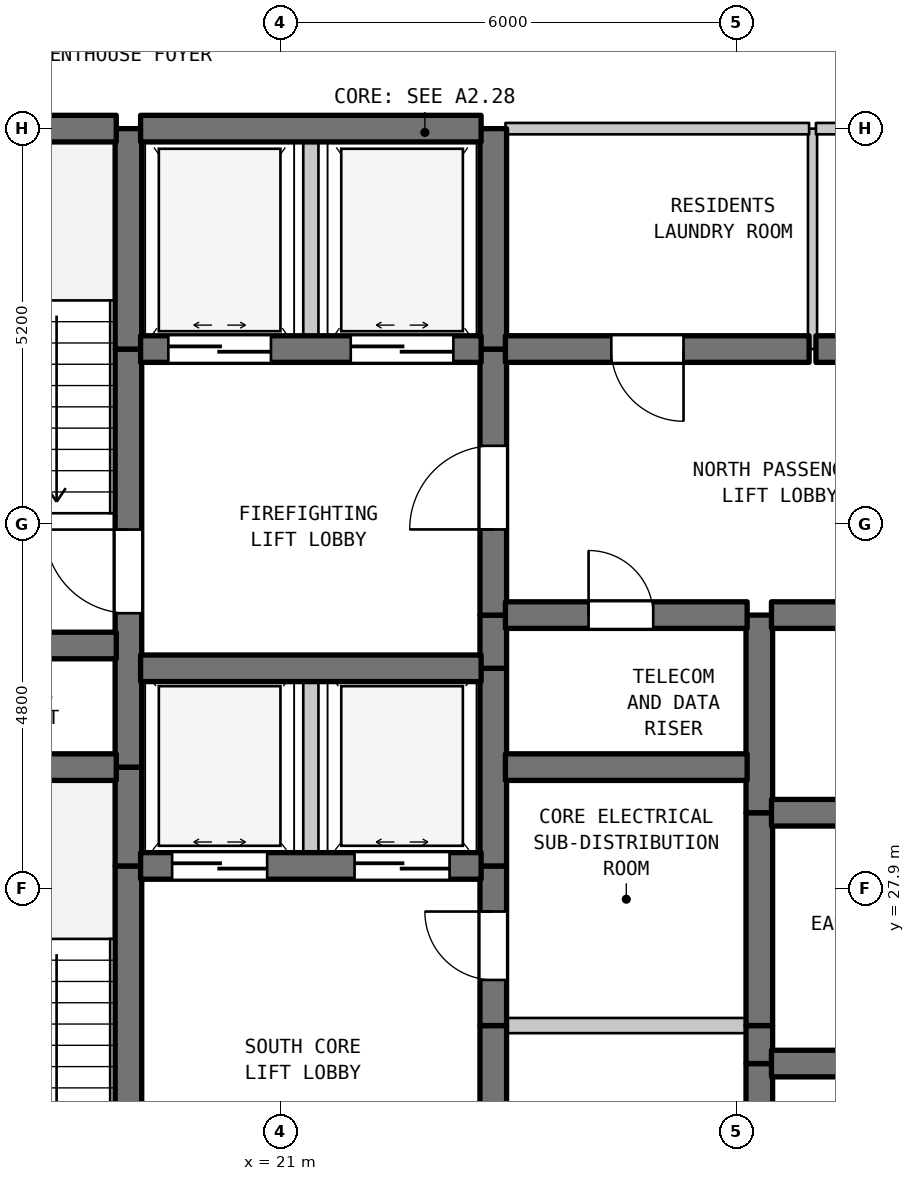
"""IFC4 building model, lengths in metres.
Left out: names, types, materials, properties, quantities, classifications, styles, units other than length and angle.
Written with IfcOpenShell. Run it as: python <this file> out.ifc"""

import sys

from ifc_helpers import new_model, si_unit, direction, frame, frame_2d, origin, place, context, subcontext, project, spatial, rectangle, extrude, element, fill, save


model = new_model("IFC4")
c1 = context("Model", 3, precision=1e-05, world=origin(), true_north=direction((0.0, 1.0)))
c2 = subcontext(c1, "Body", "Model", "MODEL_VIEW")
j1 = project(units=[si_unit("LENGTHUNIT", "METRE"), si_unit("PLANEANGLEUNIT", "RADIAN")], contexts=[c1])
p1 = place(None, origin())
s1 = spatial("IfcSite", under=j1, at=p1, CompositionType="ELEMENT")
p2 = place(p1, origin())
s2 = spatial("IfcBuilding", under=s1, at=p2, CompositionType="ELEMENT")
p3 = place(p2, frame((0.0, 0.0, 251.0)))
s3 = spatial("IfcBuildingStorey", under=s2, at=p3, CompositionType="ELEMENT", Elevation=251.0)
p4 = place(p3, frame((19.0, 22.7, 0.0), z_axis=(0.0, 0.0, 1.0), x_axis=(0.0, 1.0, 0.0)))
e1 = element("IfcWall", 1, at=p4, inside=s3, PredefinedType="SHEAR", context=c2, shape_type="SweptSolid", body=[
    extrude(rectangle(XDim=5.5, YDim=0.35, at=frame_2d((2.75, 0.0))), origin(), (0.0, 0.0, 1.0), 3.39),
])
p5 = place(p4, frame((0.631, 0.0, 0.0)))
e2 = element("IfcOpeningElement", 2, at=p5, cuts=e1, PredefinedType="OPENING", context=c2, shape_type="SweptSolid", body=[
    extrude(rectangle(XDim=1.1, YDim=2.15, at=frame_2d((0.55, 1.075))), frame((0.0, 0.185, 0.0), z_axis=(0.0, -1.0, 0.0), x_axis=(1.0, 0.0, 0.0)), (0.0, 0.0, 1.0), 0.37),
])
p6 = place(p3, frame((19.0, 28.2, 0.0), z_axis=(0.0, 0.0, 1.0), x_axis=(0.0, 1.0, 0.0)))
e3 = element("IfcWall", 3, at=p6, inside=s3, PredefinedType="SHEAR", context=c2, shape_type="SweptSolid", body=[
    extrude(rectangle(XDim=1.3, YDim=0.35, at=frame_2d((0.65, 0.0))), origin(), (0.0, 0.0, 1.0), 3.39),
])
p7 = place(p3, frame((19.0, 29.5, 0.0), z_axis=(0.0, 0.0, 1.0), x_axis=(0.0, 1.0, 0.0)))
e4 = element("IfcWall", 4, at=p7, inside=s3, PredefinedType="SHEAR", context=c2, shape_type="SweptSolid", body=[
    extrude(rectangle(XDim=5.5, YDim=0.35, at=frame_2d((2.75, 0.0))), origin(), (0.0, 0.0, 1.0), 3.39),
])
p8 = place(p7, frame((2.025, 0.0, 0.0)))
e5 = element("IfcOpeningElement", 5, at=p8, cuts=e4, PredefinedType="OPENING", context=c2, shape_type="SweptSolid", body=[
    extrude(rectangle(XDim=1.1, YDim=2.15, at=frame_2d((0.55, 1.075))), frame((0.0, 0.185, 0.0), z_axis=(0.0, -1.0, 0.0), x_axis=(1.0, 0.0, 0.0)), (0.0, 0.0, 1.0), 0.37),
])
p9 = place(p3, frame((19.0, 35.0, 0.0), z_axis=(0.0, 0.0, 1.0), x_axis=(0.0, 1.0, 0.0)))
e6 = element("IfcWall", 6, at=p9, inside=s3, PredefinedType="SHEAR", context=c2, shape_type="SweptSolid", body=[
    extrude(rectangle(XDim=2.9, YDim=0.35, at=frame_2d((1.45, 0.0))), origin(), (0.0, 0.0, 1.0), 3.39),
])
p10 = place(p3, frame((21.4, 28.2, 0.0), z_axis=(0.0, 0.0, 1.0), x_axis=(0.0, 1.0, 0.0)))
e7 = element("IfcWall", 7, at=p10, inside=s3, PredefinedType="STANDARD", context=c2, shape_type="SweptSolid", body=[
    extrude(rectangle(XDim=2.6, YDim=0.2, at=frame_2d((1.3, 0.0))), origin(), (0.0, 0.0, 1.0), 3.39),
])
p11 = place(p3, frame((21.4, 35.0, 0.0), z_axis=(0.0, 0.0, 1.0), x_axis=(0.0, 1.0, 0.0)))
e8 = element("IfcWall", 8, at=p11, inside=s3, PredefinedType="STANDARD", context=c2, shape_type="SweptSolid", body=[
    extrude(rectangle(XDim=2.9, YDim=0.2, at=frame_2d((1.45, 0.0))), origin(), (0.0, 0.0, 1.0), 3.39),
])
p12 = place(p3, frame((23.8, 22.7, 0.0), z_axis=(0.0, 0.0, 1.0), x_axis=(0.0, 1.0, 0.0)))
e9 = element("IfcWall", 9, at=p12, inside=s3, PredefinedType="SHEAR", context=c2, shape_type="SweptSolid", body=[
    extrude(rectangle(XDim=3.4, YDim=0.35, at=frame_2d((1.7, 0.0))), origin(), (0.0, 0.0, 1.0), 3.39),
])
p13 = place(p12, frame((1.25, 0.0, 0.0)))
e10 = element("IfcOpeningElement", 10, at=p13, cuts=e9, PredefinedType="OPENING", context=c2, shape_type="SweptSolid", body=[
    extrude(rectangle(XDim=0.9, YDim=2.15, at=frame_2d((0.45, 1.075))), frame((0.0, 0.185, 0.0), z_axis=(0.0, -1.0, 0.0), x_axis=(1.0, 0.0, 0.0)), (0.0, 0.0, 1.0), 0.37),
])
p14 = place(p3, frame((23.8, 26.1, 0.0), z_axis=(0.0, 0.0, 1.0), x_axis=(0.0, 1.0, 0.0)))
e11 = element("IfcWall", 11, at=p14, inside=s3, PredefinedType="SHEAR", context=c2, shape_type="SweptSolid", body=[
    extrude(rectangle(XDim=2.1, YDim=0.35, at=frame_2d((1.05, 0.0))), origin(), (0.0, 0.0, 1.0), 3.39),
])
p15 = place(p14, frame((0.6, 0.0, 0.0)))
e12 = element("IfcOpeningElement", 12, at=p15, cuts=e11, PredefinedType="OPENING", context=c2, shape_type="SweptSolid", body=[
    extrude(rectangle(XDim=0.9, YDim=2.15, at=frame_2d((0.45, 1.075))), frame((0.0, 0.185, 0.0), z_axis=(0.0, -1.0, 0.0), x_axis=(1.0, 0.0, 0.0)), (0.0, 0.0, 1.0), 0.37),
])
p16 = place(p3, frame((23.8, 28.2, 0.0), z_axis=(0.0, 0.0, 1.0), x_axis=(0.0, 1.0, 0.0)))
e13 = element("IfcWall", 13, at=p16, inside=s3, PredefinedType="SHEAR", context=c2, shape_type="SweptSolid", body=[
    extrude(rectangle(XDim=2.6, YDim=0.35, at=frame_2d((1.3, 0.0))), origin(), (0.0, 0.0, 1.0), 3.39),
])
p17 = place(p3, frame((23.8, 30.8, 0.0), z_axis=(0.0, 0.0, 1.0), x_axis=(0.0, 1.0, 0.0)))
e14 = element("IfcWall", 14, at=p17, inside=s3, PredefinedType="SHEAR", context=c2, shape_type="SweptSolid", body=[
    extrude(rectangle(XDim=0.7, YDim=0.35, at=frame_2d((0.35, 0.0))), origin(), (0.0, 0.0, 1.0), 3.39),
])
p18 = place(p3, frame((23.8, 31.5, 0.0), z_axis=(0.0, 0.0, 1.0), x_axis=(0.0, 1.0, 0.0)))
e15 = element("IfcWall", 15, at=p18, inside=s3, PredefinedType="SHEAR", context=c2, shape_type="SweptSolid", body=[
    extrude(rectangle(XDim=3.5, YDim=0.35, at=frame_2d((1.75, 0.0))), origin(), (0.0, 0.0, 1.0), 3.39),
])
p19 = place(p18, frame((1.127, 0.0, 0.0)))
e16 = element("IfcOpeningElement", 16, at=p19, cuts=e15, PredefinedType="OPENING", context=c2, shape_type="SweptSolid", body=[
    extrude(rectangle(XDim=1.1, YDim=2.15, at=frame_2d((0.55, 1.075))), frame((0.0, 0.185, 0.0), z_axis=(0.0, -1.0, 0.0), x_axis=(1.0, 0.0, 0.0)), (0.0, 0.0, 1.0), 0.37),
])
p20 = place(p3, frame((23.8, 35.0, 0.0), z_axis=(0.0, 0.0, 1.0), x_axis=(0.0, 1.0, 0.0)))
e17 = element("IfcWall", 17, at=p20, inside=s3, PredefinedType="SHEAR", context=c2, shape_type="SweptSolid", body=[
    extrude(rectangle(XDim=2.9, YDim=0.35, at=frame_2d((1.45, 0.0))), origin(), (0.0, 0.0, 1.0), 3.39),
])
p21 = place(p3, frame((27.3, 22.7, 0.0), z_axis=(0.0, 0.0, 1.0), x_axis=(0.0, 1.0, 0.0)))
e18 = element("IfcWall", 18, at=p21, inside=s3, PredefinedType="SHEAR", context=c2, shape_type="SweptSolid", body=[
    extrude(rectangle(XDim=2.9, YDim=0.35, at=frame_2d((1.45, 0.0))), origin(), (0.0, 0.0, 1.0), 3.39),
])
p22 = place(p3, frame((27.3, 25.6, 0.0), z_axis=(0.0, 0.0, 1.0), x_axis=(0.0, 1.0, 0.0)))
e19 = element("IfcWall", 19, at=p22, inside=s3, PredefinedType="SHEAR", context=c2, shape_type="SweptSolid", body=[
    extrude(rectangle(XDim=0.5, YDim=0.35, at=frame_2d((0.25, 0.0))), origin(), (0.0, 0.0, 1.0), 3.39),
])
p23 = place(p3, frame((27.3, 26.1, 0.0), z_axis=(0.0, 0.0, 1.0), x_axis=(0.0, 1.0, 0.0)))
e20 = element("IfcWall", 20, at=p23, inside=s3, PredefinedType="SHEAR", context=c2, shape_type="SweptSolid", body=[
    extrude(rectangle(XDim=2.8, YDim=0.35, at=frame_2d((1.4, 0.0))), origin(), (0.0, 0.0, 1.0), 3.39),
])
p24 = place(p3, frame((27.3, 28.9, 0.0), z_axis=(0.0, 0.0, 1.0), x_axis=(0.0, 1.0, 0.0)))
e21 = element("IfcWall", 21, at=p24, inside=s3, PredefinedType="SHEAR", context=c2, shape_type="SweptSolid", body=[
    extrude(rectangle(XDim=2.6, YDim=0.35, at=frame_2d((1.3, 0.0))), origin(), (0.0, 0.0, 1.0), 3.39),
])
p25 = place(p3, frame((28.0, 35.0, 0.0), z_axis=(0.0, 0.0, 1.0), x_axis=(0.0, 1.0, 0.0)))
e22 = element("IfcWall", 22, at=p25, inside=s3, PredefinedType="PARTITIONING", context=c2, shape_type="SweptSolid", body=[
    extrude(rectangle(XDim=2.9, YDim=0.12, at=frame_2d((1.45, 0.0))), origin(), (0.0, 0.0, 1.0), 3.39),
])
p26 = place(p3, frame((27.46, 25.6, 0.0), z_axis=(0.0, 0.0, 1.0), x_axis=(1.0, 0.0, 0.0)))
e23 = element("IfcWall", 23, at=p26, inside=s3, PredefinedType="SHEAR", context=c2, shape_type="SweptSolid", body=[
    extrude(rectangle(XDim=3.18, YDim=0.35, at=frame_2d((1.59, 0.0))), origin(), (0.0, 0.0, 1.0), 3.39),
])
p27 = place(p26, frame((1.115, 0.0, 0.0)))
e24 = element("IfcOpeningElement", 24, at=p27, cuts=e23, PredefinedType="OPENING", context=c2, shape_type="SweptSolid", body=[
    extrude(rectangle(XDim=0.95, YDim=2.15, at=frame_2d((0.475, 1.075))), frame((0.0, 0.185, 0.0), z_axis=(0.0, -1.0, 0.0), x_axis=(1.0, 0.0, 0.0)), (0.0, 0.0, 1.0), 0.37),
])
p28 = place(p3, frame((23.96, 26.1, 0.0), z_axis=(0.0, 0.0, 1.0), x_axis=(1.0, 0.0, 0.0)))
e25 = element("IfcWall", 25, at=p28, inside=s3, PredefinedType="STANDARD", context=c2, shape_type="SweptSolid", body=[
    extrude(rectangle(XDim=3.18, YDim=0.2, at=frame_2d((1.59, 0.0))), origin(), (0.0, 0.0, 1.0), 3.39),
])
p29 = place(p3, frame((19.16, 28.2, 0.0), z_axis=(0.0, 0.0, 1.0), x_axis=(1.0, 0.0, 0.0)))
e26 = element("IfcWall", 26, at=p29, inside=s3, PredefinedType="SHEAR", context=c2, shape_type="SweptSolid", body=[
    extrude(rectangle(XDim=4.48, YDim=0.35, at=frame_2d((2.24, 0.0))), origin(), (0.0, 0.0, 1.0), 3.39),
])
p30 = place(p29, frame((0.415, 0.0, 0.0)))
e27 = element("IfcOpeningElement", 27, at=p30, cuts=e26, PredefinedType="OPENING", context=c2, shape_type="SweptSolid", body=[
    extrude(rectangle(XDim=1.25, YDim=2.2, at=frame_2d((0.625, 1.1))), frame((0.0, 0.185, 0.0), z_axis=(0.0, -1.0, 0.0), x_axis=(1.0, 0.0, 0.0)), (0.0, 0.0, 1.0), 0.37),
])
p31 = place(p29, frame((2.815, 0.0, 0.0)))
e28 = element("IfcOpeningElement", 28, at=p31, cuts=e26, PredefinedType="OPENING", context=c2, shape_type="SweptSolid", body=[
    extrude(rectangle(XDim=1.25, YDim=2.2, at=frame_2d((0.625, 1.1))), frame((0.0, 0.185, 0.0), z_axis=(0.0, -1.0, 0.0), x_axis=(1.0, 0.0, 0.0)), (0.0, 0.0, 1.0), 0.37),
])
p32 = place(p3, frame((27.46, 28.9, 0.0), z_axis=(0.0, 0.0, 1.0), x_axis=(1.0, 0.0, 0.0)))
e29 = element("IfcWall", 29, at=p32, inside=s3, PredefinedType="SHEAR", context=c2, shape_type="SweptSolid", body=[
    extrude(rectangle(XDim=3.18, YDim=0.35, at=frame_2d((1.59, 0.0))), origin(), (0.0, 0.0, 1.0), 3.39),
])
p33 = place(p32, frame((1.115, 0.0, 0.0)))
e30 = element("IfcOpeningElement", 30, at=p33, cuts=e29, PredefinedType="OPENING", context=c2, shape_type="SweptSolid", body=[
    extrude(rectangle(XDim=0.95, YDim=2.15, at=frame_2d((0.475, 1.075))), frame((0.0, 0.185, 0.0), z_axis=(0.0, -1.0, 0.0), x_axis=(1.0, 0.0, 0.0)), (0.0, 0.0, 1.0), 0.37),
])
p34 = place(p3, frame((15.16, 29.5, 0.0), z_axis=(0.0, 0.0, 1.0), x_axis=(1.0, 0.0, 0.0)))
e31 = element("IfcWall", 31, at=p34, inside=s3, PredefinedType="SHEAR", context=c2, shape_type="SweptSolid", body=[
    extrude(rectangle(XDim=3.68, YDim=0.35, at=frame_2d((1.84, 0.0))), origin(), (0.0, 0.0, 1.0), 3.39),
])
p35 = place(p3, frame((23.96, 29.5, 0.0), z_axis=(0.0, 0.0, 1.0), x_axis=(1.0, 0.0, 0.0)))
e32 = element("IfcWall", 32, at=p35, inside=s3, PredefinedType="SHEAR", context=c2, shape_type="SweptSolid", body=[
    extrude(rectangle(XDim=3.18, YDim=0.35, at=frame_2d((1.59, 0.0))), origin(), (0.0, 0.0, 1.0), 3.39),
])
p36 = place(p3, frame((19.16, 30.8, 0.0), z_axis=(0.0, 0.0, 1.0), x_axis=(1.0, 0.0, 0.0)))
e33 = element("IfcWall", 33, at=p36, inside=s3, PredefinedType="SHEAR", context=c2, shape_type="SweptSolid", body=[
    extrude(rectangle(XDim=4.48, YDim=0.35, at=frame_2d((2.24, 0.0))), origin(), (0.0, 0.0, 1.0), 3.39),
])
p37 = place(p3, frame((15.16, 31.1, 0.0), z_axis=(0.0, 0.0, 1.0), x_axis=(1.0, 0.0, 0.0)))
e34 = element("IfcWall", 34, at=p37, inside=s3, PredefinedType="SHEAR", context=c2, shape_type="SweptSolid", body=[
    extrude(rectangle(XDim=3.68, YDim=0.35, at=frame_2d((1.84, 0.0))), origin(), (0.0, 0.0, 1.0), 3.39),
])
p38 = place(p3, frame((23.96, 31.5, 0.0), z_axis=(0.0, 0.0, 1.0), x_axis=(1.0, 0.0, 0.0)))
e35 = element("IfcWall", 35, at=p38, inside=s3, PredefinedType="SHEAR", context=c2, shape_type="SweptSolid", body=[
    extrude(rectangle(XDim=3.18, YDim=0.35, at=frame_2d((1.59, 0.0))), origin(), (0.0, 0.0, 1.0), 3.39),
])
p39 = place(p38, frame((1.094, 0.0, 0.0)))
e36 = element("IfcOpeningElement", 36, at=p39, cuts=e35, PredefinedType="OPENING", context=c2, shape_type="SweptSolid", body=[
    extrude(rectangle(XDim=0.85, YDim=2.1, at=frame_2d((0.425, 1.05))), frame((0.0, 0.185, 0.0), z_axis=(0.0, -1.0, 0.0), x_axis=(1.0, 0.0, 0.0)), (0.0, 0.0, 1.0), 0.37),
])
p40 = place(p3, frame((27.46, 31.5, 0.0), z_axis=(0.0, 0.0, 1.0), x_axis=(1.0, 0.0, 0.0)))
e37 = element("IfcWall", 37, at=p40, inside=s3, PredefinedType="SHEAR", context=c2, shape_type="SweptSolid", body=[
    extrude(rectangle(XDim=3.18, YDim=0.35, at=frame_2d((1.59, 0.0))), origin(), (0.0, 0.0, 1.0), 3.39),
])
p41 = place(p3, frame((19.16, 35.0, 0.0), z_axis=(0.0, 0.0, 1.0), x_axis=(1.0, 0.0, 0.0)))
e38 = element("IfcWall", 38, at=p41, inside=s3, PredefinedType="SHEAR", context=c2, shape_type="SweptSolid", body=[
    extrude(rectangle(XDim=4.48, YDim=0.35, at=frame_2d((2.24, 0.0))), origin(), (0.0, 0.0, 1.0), 3.39),
])
p42 = place(p41, frame((0.365, 0.0, 0.0)))
e39 = element("IfcOpeningElement", 39, at=p42, cuts=e38, PredefinedType="OPENING", context=c2, shape_type="SweptSolid", body=[
    extrude(rectangle(XDim=1.35, YDim=2.2, at=frame_2d((0.675, 1.1))), frame((0.0, 0.185, 0.0), z_axis=(0.0, -1.0, 0.0), x_axis=(1.0, 0.0, 0.0)), (0.0, 0.0, 1.0), 0.37),
])
p43 = place(p41, frame((2.765, 0.0, 0.0)))
e40 = element("IfcOpeningElement", 40, at=p43, cuts=e38, PredefinedType="OPENING", context=c2, shape_type="SweptSolid", body=[
    extrude(rectangle(XDim=1.35, YDim=2.2, at=frame_2d((0.675, 1.1))), frame((0.0, 0.185, 0.0), z_axis=(0.0, -1.0, 0.0), x_axis=(1.0, 0.0, 0.0)), (0.0, 0.0, 1.0), 0.37),
])
p44 = place(p3, frame((23.96, 35.0, 0.0), z_axis=(0.0, 0.0, 1.0), x_axis=(1.0, 0.0, 0.0)))
e41 = element("IfcWall", 41, at=p44, inside=s3, PredefinedType="SHEAR", context=c2, shape_type="SweptSolid", body=[
    extrude(rectangle(XDim=3.995, YDim=0.35, at=frame_2d((1.998, 0.0))), origin(), (0.0, 0.0, 1.0), 3.39),
])
p45 = place(p44, frame((1.393, 0.0, 0.0)))
e42 = element("IfcOpeningElement", 42, at=p45, cuts=e41, PredefinedType="OPENING", context=c2, shape_type="SweptSolid", body=[
    extrude(rectangle(XDim=0.95, YDim=2.15, at=frame_2d((0.475, 1.075))), frame((0.0, 0.185, 0.0), z_axis=(0.0, -1.0, 0.0), x_axis=(1.0, 0.0, 0.0)), (0.0, 0.0, 1.0), 0.37),
])
p46 = place(p3, frame((28.045, 35.0, 0.0), z_axis=(0.0, 0.0, 1.0), x_axis=(1.0, 0.0, 0.0)))
e43 = element("IfcWall", 43, at=p46, inside=s3, PredefinedType="SHEAR", context=c2, shape_type="SweptSolid", body=[
    extrude(rectangle(XDim=2.595, YDim=0.35, at=frame_2d((1.297, 0.0))), origin(), (0.0, 0.0, 1.0), 3.39),
])
p47 = place(p46, frame((0.806, 0.0, 0.0)))
e44 = element("IfcOpeningElement", 44, at=p47, cuts=e43, PredefinedType="OPENING", context=c2, shape_type="SweptSolid", body=[
    extrude(rectangle(XDim=0.95, YDim=2.15, at=frame_2d((0.475, 1.075))), frame((0.0, 0.185, 0.0), z_axis=(0.0, -1.0, 0.0), x_axis=(1.0, 0.0, 0.0)), (0.0, 0.0, 1.0), 0.37),
])
p48 = place(p3, frame((15.16, 37.9, 0.0), z_axis=(0.0, 0.0, 1.0), x_axis=(1.0, 0.0, 0.0)))
e45 = element("IfcWall", 45, at=p48, inside=s3, PredefinedType="SHEAR", context=c2, shape_type="SweptSolid", body=[
    extrude(rectangle(XDim=3.68, YDim=0.35, at=frame_2d((1.84, 0.0))), origin(), (0.0, 0.0, 1.0), 3.39),
])
p49 = place(p3, frame((19.16, 37.9, 0.0), z_axis=(0.0, 0.0, 1.0), x_axis=(1.0, 0.0, 0.0)))
e46 = element("IfcWall", 46, at=p49, inside=s3, PredefinedType="SHEAR", context=c2, shape_type="SweptSolid", body=[
    extrude(rectangle(XDim=4.48, YDim=0.35, at=frame_2d((2.24, 0.0))), origin(), (0.0, 0.0, 1.0), 3.39),
])
p50 = place(p3, frame((23.96, 37.9, 0.0), z_axis=(0.0, 0.0, 1.0), x_axis=(1.0, 0.0, 0.0)))
e47 = element("IfcWall", 47, at=p50, inside=s3, PredefinedType="STANDARD", context=c2, shape_type="SweptSolid", body=[
    extrude(rectangle(XDim=3.995, YDim=0.15, at=frame_2d((1.998, 0.0))), origin(), (0.0, 0.0, 1.0), 2.89),
])
p51 = place(p3, frame((28.045, 37.9, 0.0), z_axis=(0.0, 0.0, 1.0), x_axis=(1.0, 0.0, 0.0)))
e48 = element("IfcWall", 48, at=p51, inside=s3, PredefinedType="STANDARD", context=c2, shape_type="SweptSolid", body=[
    extrude(rectangle(XDim=2.695, YDim=0.15, at=frame_2d((1.348, 0.0))), origin(), (0.0, 0.0, 1.0), 2.89),
])
p52 = place(p8, origin())
e49 = element("IfcDoor", 49, at=p52, inside=s3, OperationType="SINGLE_SWING_RIGHT", PredefinedType="DOOR", context=c2, shape_type="SweptSolid", body=[
    extrude(rectangle(XDim=1.1, YDim=2.15, at=frame_2d((0.55, 1.075))), frame((0.0, 0.025, 0.0), z_axis=(0.0, -1.0, 0.0), x_axis=(1.0, 0.0, 0.0)), (0.0, 0.0, 1.0), 0.05),
])
fill(e5, e49)
p53 = place(p15, origin())
e50 = element("IfcDoor", 50, at=p53, inside=s3, OperationType="SINGLE_SWING_RIGHT", PredefinedType="DOOR", context=c2, shape_type="SweptSolid", body=[
    extrude(rectangle(XDim=0.9, YDim=2.15, at=frame_2d((0.45, 1.075))), frame((0.0, 0.025, 0.0), z_axis=(0.0, -1.0, 0.0), x_axis=(1.0, 0.0, 0.0)), (0.0, 0.0, 1.0), 0.05),
])
fill(e12, e50)
p54 = place(p19, origin())
e51 = element("IfcDoor", 51, at=p54, inside=s3, OperationType="SINGLE_SWING_LEFT", PredefinedType="DOOR", context=c2, shape_type="SweptSolid", body=[
    extrude(rectangle(XDim=1.1, YDim=2.15, at=frame_2d((0.55, 1.075))), frame((0.0, 0.025, 0.0), z_axis=(0.0, -1.0, 0.0), x_axis=(1.0, 0.0, 0.0)), (0.0, 0.0, 1.0), 0.05),
])
fill(e16, e51)
p55 = place(p30, origin())
e52 = element("IfcDoor", 52, at=p55, inside=s3, OperationType="DOUBLE_DOOR_SLIDING", PredefinedType="DOOR", context=c2, shape_type="SweptSolid", body=[
    extrude(rectangle(XDim=1.25, YDim=2.2, at=frame_2d((0.625, 1.1))), frame((0.0, 0.025, 0.0), z_axis=(0.0, -1.0, 0.0), x_axis=(1.0, 0.0, 0.0)), (0.0, 0.0, 1.0), 0.05),
])
fill(e27, e52)
p56 = place(p31, origin())
e53 = element("IfcDoor", 53, at=p56, inside=s3, OperationType="DOUBLE_DOOR_SLIDING", PredefinedType="DOOR", context=c2, shape_type="SweptSolid", body=[
    extrude(rectangle(XDim=1.25, YDim=2.2, at=frame_2d((0.625, 1.1))), frame((0.0, 0.025, 0.0), z_axis=(0.0, -1.0, 0.0), x_axis=(1.0, 0.0, 0.0)), (0.0, 0.0, 1.0), 0.05),
])
fill(e28, e53)
p57 = place(p39, origin())
e54 = element("IfcDoor", 54, at=p57, inside=s3, OperationType="SINGLE_SWING_LEFT", PredefinedType="DOOR", context=c2, shape_type="SweptSolid", body=[
    extrude(rectangle(XDim=0.85, YDim=2.1, at=frame_2d((0.425, 1.05))), frame((0.0, 0.025, 0.0), z_axis=(0.0, -1.0, 0.0), x_axis=(1.0, 0.0, 0.0)), (0.0, 0.0, 1.0), 0.05),
])
fill(e36, e54)
p58 = place(p42, origin())
e55 = element("IfcDoor", 55, at=p58, inside=s3, OperationType="DOUBLE_DOOR_SLIDING", PredefinedType="DOOR", context=c2, shape_type="SweptSolid", body=[
    extrude(rectangle(XDim=1.35, YDim=2.2, at=frame_2d((0.675, 1.1))), frame((0.0, 0.025, 0.0), z_axis=(0.0, -1.0, 0.0), x_axis=(1.0, 0.0, 0.0)), (0.0, 0.0, 1.0), 0.05),
])
fill(e39, e55)
p59 = place(p43, origin())
e56 = element("IfcDoor", 56, at=p59, inside=s3, OperationType="DOUBLE_DOOR_SLIDING", PredefinedType="DOOR", context=c2, shape_type="SweptSolid", body=[
    extrude(rectangle(XDim=1.35, YDim=2.2, at=frame_2d((0.675, 1.1))), frame((0.0, 0.025, 0.0), z_axis=(0.0, -1.0, 0.0), x_axis=(1.0, 0.0, 0.0)), (0.0, 0.0, 1.0), 0.05),
])
fill(e40, e56)
p60 = place(p45, frame((0.95, 0.0, 0.0), z_axis=(0.0, 0.0, 1.0), x_axis=(-1.0, 0.0, 0.0)))
e57 = element("IfcDoor", 57, at=p60, inside=s3, OperationType="SINGLE_SWING_RIGHT", PredefinedType="DOOR", context=c2, shape_type="SweptSolid", body=[
    extrude(rectangle(XDim=0.95, YDim=2.15, at=frame_2d((0.475, 1.075))), frame((0.0, 0.025, 0.0), z_axis=(0.0, -1.0, 0.0), x_axis=(1.0, 0.0, 0.0)), (0.0, 0.0, 1.0), 0.05),
])
fill(e42, e57)
save(model, sys.argv[1])
